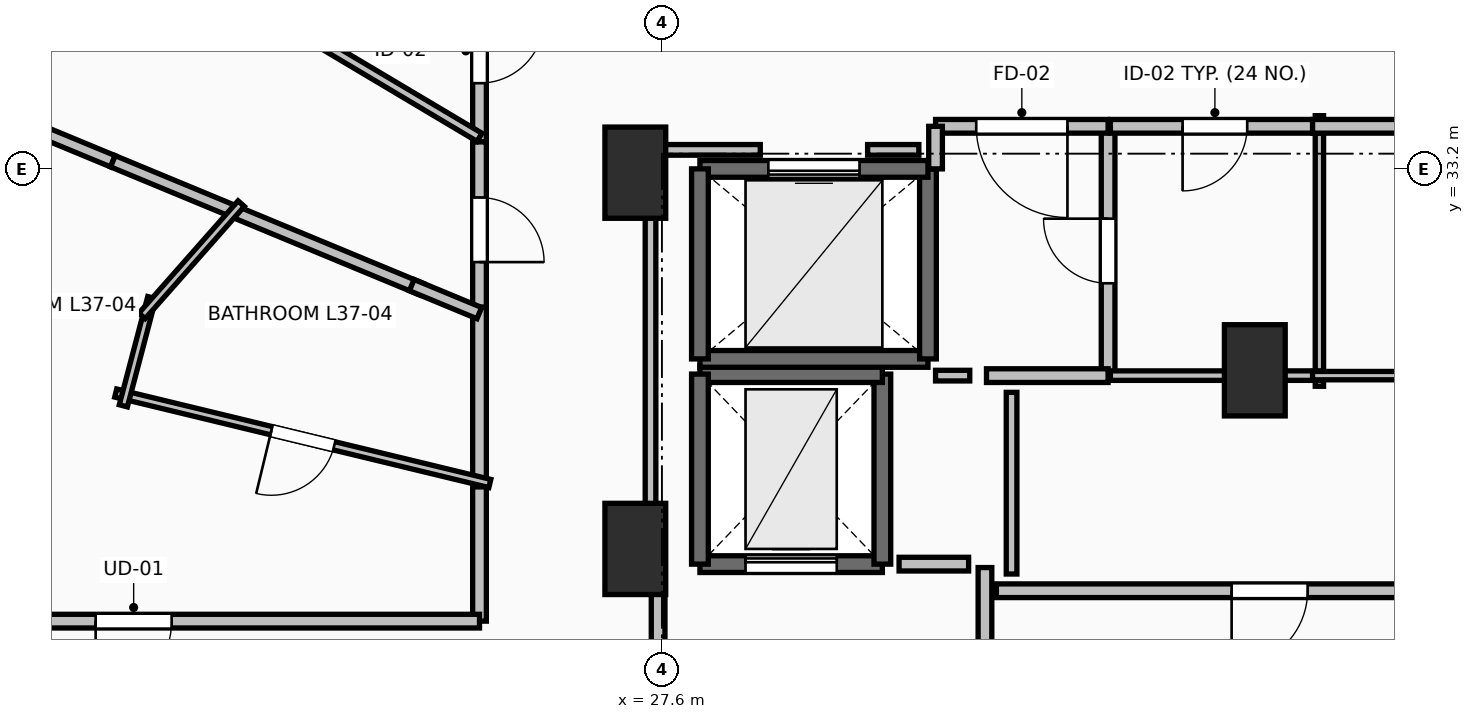
"""IFC4 building model, lengths in metres.
Left out: names, types, materials, properties, quantities, classifications, styles, units other than length and angle.
Written with IfcOpenShell. Run it as: python <this file> out.ifc"""

import sys

from ifc_helpers import new_model, si_unit, direction, frame, frame_2d, origin, origin_2d, place, context, subcontext, project, spatial, rectangle, extrude, element, fill, save


model = new_model("IFC4")
c1 = context("Model", 3, precision=1e-05, world=origin(), true_north=direction((0.0, 1.0)))
c2 = subcontext(c1, "Body", "Model", "MODEL_VIEW")
j1 = project(units=[si_unit("LENGTHUNIT", "METRE"), si_unit("PLANEANGLEUNIT", "RADIAN")], contexts=[c1])
p1 = place(None, origin())
s1 = spatial("IfcSite", under=j1, at=p1, CompositionType="ELEMENT")
p2 = place(p1, origin())
s2 = spatial("IfcBuilding", under=s1, at=p2, CompositionType="ELEMENT")
p3 = place(p2, frame((0.0, 0.0, 139.6)))
s3 = spatial("IfcBuildingStorey", under=s2, at=p3, CompositionType="ELEMENT", Elevation=139.6)
for number, where, z_axis, x_axis in (
    (1, (27.25, 28.2, 0.0), (0.0, 0.0, 1.0), (1.0, 0.0, 0.0)),
    (2, (27.25, 33.15, 0.0), (0.0, 0.0, 1.0), (1.0, 0.0, 0.0)),
    (3, (35.4, 30.55, 0.0), (0.0, 0.0, 1.0), (1.0, 0.0, 0.0)),
):
    element("IfcColumn", number, at=place(p3, frame(where, z_axis=z_axis, x_axis=x_axis)), inside=s3, PredefinedType="PILASTER", context=c2, shape_type="SweptSolid", body=[
        extrude(rectangle(XDim=0.8, YDim=1.2, at=origin_2d()), origin(), (0.0, 0.0, 1.0), 3.5),
    ])
p4 = place(p3, frame((28.1, 28.0, 0.0), z_axis=(0.0, 0.0, 1.0), x_axis=(1.0, 0.0, 0.0)))
e4 = element("IfcWall", 4, at=p4, inside=s3, PredefinedType="SHEAR", context=c2, shape_type="SweptSolid", body=[
    extrude(rectangle(XDim=2.4, YDim=0.22, at=frame_2d((1.2, 0.0))), origin(), (0.0, 0.0, 1.0), 3.24),
])
p5 = place(p4, frame((0.6, 0.0, 0.0)))
e5 = element("IfcOpeningElement", 5, at=p5, cuts=e4, PredefinedType="OPENING", context=c2, shape_type="SweptSolid", body=[
    extrude(rectangle(XDim=1.2, YDim=2.2, at=frame_2d((0.6, 1.1))), frame((0.0, 0.125, 0.0), z_axis=(0.0, -1.0, 0.0), x_axis=(1.0, 0.0, 0.0)), (0.0, 0.0, 1.0), 0.25),
])
p6 = place(p3, frame((30.5, 28.0, 0.0), z_axis=(0.0, 0.0, 1.0), x_axis=(0.0, 1.0, 0.0)))
e6 = element("IfcWall", 6, at=p6, inside=s3, PredefinedType="SHEAR", context=c2, shape_type="SweptSolid", body=[
    extrude(rectangle(XDim=2.5, YDim=0.22, at=frame_2d((1.25, 0.0))), origin(), (0.0, 0.0, 1.0), 3.24),
])
p7 = place(p3, frame((30.5, 30.5, 0.0), z_axis=(0.0, 0.0, 1.0), x_axis=(-1.0, 0.0, 0.0)))
e7 = element("IfcWall", 7, at=p7, inside=s3, PredefinedType="SHEAR", context=c2, shape_type="SweptSolid", body=[
    extrude(rectangle(XDim=2.4, YDim=0.22, at=frame_2d((1.2, 0.0))), origin(), (0.0, 0.0, 1.0), 3.24),
])
p8 = place(p3, frame((28.1, 30.5, 0.0), z_axis=(0.0, 0.0, 1.0), x_axis=(0.0, -1.0, 0.0)))
e8 = element("IfcWall", 8, at=p8, inside=s3, PredefinedType="SHEAR", context=c2, shape_type="SweptSolid", body=[
    extrude(rectangle(XDim=2.5, YDim=0.22, at=frame_2d((1.25, 0.0))), origin(), (0.0, 0.0, 1.0), 3.24),
])
p9 = place(p3, frame((28.1, 30.7, 0.0), z_axis=(0.0, 0.0, 1.0), x_axis=(1.0, 0.0, 0.0)))
e9 = element("IfcWall", 9, at=p9, inside=s3, PredefinedType="SOLIDWALL", context=c2, shape_type="SweptSolid", body=[
    extrude(rectangle(XDim=3.0, YDim=0.22, at=frame_2d((1.5, 0.0))), origin(), (0.0, 0.0, 1.0), 3.24),
])
p10 = place(p3, frame((31.1, 30.7, 0.0), z_axis=(0.0, 0.0, 1.0), x_axis=(0.0, 1.0, 0.0)))
e10 = element("IfcWall", 10, at=p10, inside=s3, PredefinedType="SOLIDWALL", context=c2, shape_type="SweptSolid", body=[
    extrude(rectangle(XDim=2.5, YDim=0.22, at=frame_2d((1.25, 0.0))), origin(), (0.0, 0.0, 1.0), 3.24),
])
p11 = place(p3, frame((31.1, 33.2, 0.0), z_axis=(0.0, 0.0, 1.0), x_axis=(-1.0, 0.0, 0.0)))
e11 = element("IfcWall", 11, at=p11, inside=s3, PredefinedType="SOLIDWALL", context=c2, shape_type="SweptSolid", body=[
    extrude(rectangle(XDim=3.0, YDim=0.22, at=frame_2d((1.5, 0.0))), origin(), (0.0, 0.0, 1.0), 3.24),
])
p12 = place(p11, frame((0.9, 0.0, 0.0)))
e12 = element("IfcOpeningElement", 12, at=p12, cuts=e11, PredefinedType="OPENING", context=c2, shape_type="SweptSolid", body=[
    extrude(rectangle(XDim=1.2, YDim=2.2, at=frame_2d((0.6, 1.1))), frame((0.0, 0.125, 0.0), z_axis=(0.0, -1.0, 0.0), x_axis=(1.0, 0.0, 0.0)), (0.0, 0.0, 1.0), 0.25),
])
p13 = place(p3, frame((28.1, 33.2, 0.0), z_axis=(0.0, 0.0, 1.0), x_axis=(0.0, -1.0, 0.0)))
e13 = element("IfcWall", 13, at=p13, inside=s3, PredefinedType="SOLIDWALL", context=c2, shape_type="SweptSolid", body=[
    extrude(rectangle(XDim=2.5, YDim=0.22, at=frame_2d((1.25, 0.0))), origin(), (0.0, 0.0, 1.0), 3.24),
])
p14 = place(p3, frame((31.85, 24.045, 0.0), z_axis=(0.0, 0.0, 1.0), x_axis=(0.0, 1.0, 0.0)))
e14 = element("IfcWall", 14, at=p14, inside=s3, PredefinedType="PARTITIONING", context=c2, shape_type="SweptSolid", body=[
    extrude(rectangle(XDim=3.91, YDim=0.18, at=frame_2d((1.955, 0.0))), origin(), (0.0, 0.0, 1.0), 3.24),
])
p15 = place(p14, frame((1.355, 0.0, 0.0)))
e15 = element("IfcOpeningElement", 15, at=p15, cuts=e14, PredefinedType="OPENING", context=c2, shape_type="SweptSolid", body=[
    extrude(rectangle(XDim=1.2, YDim=2.15, at=frame_2d((0.6, 1.075))), frame((0.0, 0.105, 0.0), z_axis=(0.0, -1.0, 0.0), x_axis=(1.0, 0.0, 0.0)), (0.0, 0.0, 1.0), 0.21),
])
p16 = place(p3, frame((27.55, 28.0, 0.0), z_axis=(0.0, 0.0, 1.0), x_axis=(0.0, -1.0, 0.0)))
e16 = element("IfcWall", 16, at=p16, inside=s3, PredefinedType="PARTITIONING", context=c2, shape_type="SweptSolid", body=[
    extrude(rectangle(XDim=4.05, YDim=0.18, at=frame_2d((2.025, 0.0))), origin(), (0.0, 0.0, 1.0), 3.24),
])
p17 = place(p16, frame((1.425, 0.0, 0.0)))
e17 = element("IfcOpeningElement", 17, at=p17, cuts=e16, PredefinedType="OPENING", context=c2, shape_type="SweptSolid", body=[
    extrude(rectangle(XDim=1.2, YDim=2.15, at=frame_2d((0.6, 1.075))), frame((0.0, 0.105, 0.0), z_axis=(0.0, -1.0, 0.0), x_axis=(1.0, 0.0, 0.0)), (0.0, 0.0, 1.0), 0.21),
])
p18 = place(p3, frame((33.47, 30.48, 0.0), z_axis=(0.0, 0.0, 1.0), x_axis=(0.0, 1.0, 0.0)))
e18 = element("IfcWall", 18, at=p18, inside=s3, PredefinedType="PARTITIONING", context=c2, shape_type="SweptSolid", body=[
    extrude(rectangle(XDim=3.28, YDim=0.18, at=frame_2d((1.64, 0.0))), origin(), (0.0, 0.0, 1.0), 3.24),
])
p19 = place(p18, frame((1.215, 0.0, 0.0)))
e19 = element("IfcOpeningElement", 19, at=p19, cuts=e18, PredefinedType="OPENING", context=c2, shape_type="SweptSolid", body=[
    extrude(rectangle(XDim=0.85, YDim=2.1, at=frame_2d((0.425, 1.05))), frame((0.0, 0.105, 0.0), z_axis=(0.0, -1.0, 0.0), x_axis=(1.0, 0.0, 0.0)), (0.0, 0.0, 1.0), 0.21),
])
p20 = place(p3, frame((31.87, 30.48, 0.0), z_axis=(0.0, 0.0, 1.0), x_axis=(1.0, 0.0, 0.0)))
e20 = element("IfcWall", 20, at=p20, inside=s3, PredefinedType="PARTITIONING", context=c2, shape_type="SweptSolid", body=[
    extrude(rectangle(XDim=1.6, YDim=0.18, at=frame_2d((0.8, 0.0))), origin(), (0.0, 0.0, 1.0), 3.24),
])
p21 = place(p3, frame((33.47, 33.76, 0.0), z_axis=(0.0, 0.0, 1.0), x_axis=(-1.0, 0.0, 0.0)))
e21 = element("IfcWall", 21, at=p21, inside=s3, PredefinedType="PARTITIONING", context=c2, shape_type="SweptSolid", body=[
    extrude(rectangle(XDim=2.27, YDim=0.18, at=frame_2d((1.135, 0.0))), origin(), (0.0, 0.0, 1.0), 3.24),
])
p22 = place(p21, frame((0.535, 0.0, 0.0)))
e22 = element("IfcOpeningElement", 22, at=p22, cuts=e21, PredefinedType="OPENING", context=c2, shape_type="SweptSolid", body=[
    extrude(rectangle(XDim=1.2, YDim=2.15, at=frame_2d((0.6, 1.075))), frame((0.0, 0.105, 0.0), z_axis=(0.0, -1.0, 0.0), x_axis=(1.0, 0.0, 0.0)), (0.0, 0.0, 1.0), 0.21),
])
p23 = place(p3, frame((31.2, 33.76, 0.0), z_axis=(0.0, 0.0, 1.0), x_axis=(0.0, -1.0, 0.0)))
e23 = element("IfcWall", 23, at=p23, inside=s3, PredefinedType="PARTITIONING", context=c2, shape_type="SweptSolid", body=[
    extrude(rectangle(XDim=0.56, YDim=0.18, at=frame_2d((0.28, 0.0))), origin(), (0.0, 0.0, 1.0), 3.24),
])
p24 = place(p3, frame((39.19, 27.65, 0.0), z_axis=(0.0, 0.0, 1.0), x_axis=(-1.0, 0.0, 0.0)))
e24 = element("IfcWall", 24, at=p24, inside=s3, PredefinedType="PARTITIONING", context=c2, shape_type="SweptSolid", body=[
    extrude(rectangle(XDim=7.19, YDim=0.18, at=frame_2d((3.595, 0.0))), origin(), (0.0, 0.0, 1.0), 3.24),
])
p25 = place(p24, frame((3.095, 0.0, 0.0)))
e25 = element("IfcOpeningElement", 25, at=p25, cuts=e24, PredefinedType="OPENING", context=c2, shape_type="SweptSolid", body=[
    extrude(rectangle(XDim=1.0, YDim=2.15, at=frame_2d((0.5, 1.075))), frame((0.0, 0.105, 0.0), z_axis=(0.0, -1.0, 0.0), x_axis=(1.0, 0.0, 0.0)), (0.0, 0.0, 1.0), 0.21),
])
p26 = place(p3, frame((36.25, 30.34, 0.0), z_axis=(0.0, 0.0, 1.0), x_axis=(0.0, 1.0, 0.0)))
e26 = element("IfcWall", 26, at=p26, inside=s3, PredefinedType="PARTITIONING", context=c2, shape_type="SweptSolid", body=[
    extrude(rectangle(XDim=3.56, YDim=0.11, at=frame_2d((1.78, 0.0))), origin(), (0.0, 0.0, 1.0), 2.432),
])
p27 = place(p3, frame((33.5, 30.48, 0.0), z_axis=(0.0, 0.0, 1.0), x_axis=(1.0, 0.0, 0.0)))
e27 = element("IfcWall", 27, at=p27, inside=s3, PredefinedType="PARTITIONING", context=c2, shape_type="SweptSolid", body=[
    extrude(rectangle(XDim=2.75, YDim=0.125, at=frame_2d((1.375, 0.0))), origin(), (0.0, 0.0, 1.0), 2.432),
])
p28 = place(p3, frame((36.25, 33.76, 0.0), z_axis=(0.0, 0.0, 1.0), x_axis=(-1.0, 0.0, 0.0)))
e28 = element("IfcWall", 28, at=p28, inside=s3, PredefinedType="PARTITIONING", context=c2, shape_type="SweptSolid", body=[
    extrude(rectangle(XDim=2.75, YDim=0.18, at=frame_2d((1.375, 0.0))), origin(), (0.0, 0.0, 1.0), 3.24),
])
p29 = place(p28, frame((0.95, 0.0, 0.0)))
e29 = element("IfcOpeningElement", 29, at=p29, cuts=e28, PredefinedType="OPENING", context=c2, shape_type="SweptSolid", body=[
    extrude(rectangle(XDim=0.85, YDim=2.1, at=frame_2d((0.425, 1.05))), frame((0.0, 0.105, 0.0), z_axis=(0.0, -1.0, 0.0), x_axis=(1.0, 0.0, 0.0)), (0.0, 0.0, 1.0), 0.21),
])
p30 = place(p3, frame((36.16, 30.48, 0.0), z_axis=(0.0, 0.0, 1.0), x_axis=(1.0, 0.0, 0.0)))
e30 = element("IfcWall", 30, at=p30, inside=s3, PredefinedType="PARTITIONING", context=c2, shape_type="SweptSolid", body=[
    extrude(rectangle(XDim=3.16, YDim=0.11, at=frame_2d((1.58, 0.0))), origin(), (0.0, 0.0, 1.0), 2.432),
])
p31 = place(p3, frame((39.79, 33.76, 0.0), z_axis=(0.0, 0.0, 1.0), x_axis=(-1.0, 0.0, 0.0)))
e31 = element("IfcWall", 31, at=p31, inside=s3, PredefinedType="PARTITIONING", context=c2, shape_type="SweptSolid", body=[
    extrude(rectangle(XDim=3.63, YDim=0.18, at=frame_2d((1.815, 0.0))), origin(), (0.0, 0.0, 1.0), 3.24),
])
p32 = place(p31, frame((1.39, 0.0, 0.0)))
e32 = element("IfcOpeningElement", 32, at=p32, cuts=e31, PredefinedType="OPENING", context=c2, shape_type="SweptSolid", body=[
    extrude(rectangle(XDim=0.85, YDim=2.1, at=frame_2d((0.425, 1.05))), frame((0.0, 0.105, 0.0), z_axis=(0.0, -1.0, 0.0), x_axis=(1.0, 0.0, 0.0)), (0.0, 0.0, 1.0), 0.21),
])
p33 = place(p3, frame((25.2, 35.95, 0.0), z_axis=(0.0, 0.0, 1.0), x_axis=(0.0, -1.0, 0.0)))
e33 = element("IfcWall", 33, at=p33, inside=s3, PredefinedType="PARTITIONING", context=c2, shape_type="SweptSolid", body=[
    extrude(rectangle(XDim=2.395, YDim=0.18, at=frame_2d((1.198, 0.0))), origin(), (0.0, 0.0, 1.0), 2.432),
])
p34 = place(p33, frame((0.772, 0.0, 0.0)))
e34 = element("IfcOpeningElement", 34, at=p34, cuts=e33, PredefinedType="OPENING", context=c2, shape_type="SweptSolid", body=[
    extrude(rectangle(XDim=0.85, YDim=2.1, at=frame_2d((0.425, 1.05))), frame((0.0, 0.105, 0.0), z_axis=(0.0, -1.0, 0.0), x_axis=(1.0, 0.0, 0.0)), (0.0, 0.0, 1.0), 0.21),
])
p35 = place(p3, frame((25.2, 33.555, 0.0), z_axis=(0.0, 0.0, 1.0), x_axis=(0.0, -1.0, 0.0)))
e35 = element("IfcWall", 35, at=p35, inside=s3, PredefinedType="PARTITIONING", context=c2, shape_type="SweptSolid", body=[
    extrude(rectangle(XDim=2.313, YDim=0.18, at=frame_2d((1.156, 0.0))), origin(), (0.0, 0.0, 1.0), 3.24),
])
p36 = place(p35, frame((0.731, 0.0, 0.0)))
e36 = element("IfcOpeningElement", 36, at=p36, cuts=e35, PredefinedType="OPENING", context=c2, shape_type="SweptSolid", body=[
    extrude(rectangle(XDim=0.85, YDim=2.1, at=frame_2d((0.425, 1.05))), frame((0.0, 0.105, 0.0), z_axis=(0.0, -1.0, 0.0), x_axis=(1.0, 0.0, 0.0)), (0.0, 0.0, 1.0), 0.21),
])
p37 = place(p3, frame((25.2, 29.156, 0.0), z_axis=(0.0, 0.0, 1.0), x_axis=(0.0, -1.0, 0.0)))
e37 = element("IfcWall", 37, at=p37, inside=s3, PredefinedType="PARTITIONING", context=c2, shape_type="SweptSolid", body=[
    extrude(rectangle(XDim=1.906, YDim=0.18, at=frame_2d((0.953, 0.0))), origin(), (0.0, 0.0, 1.0), 2.432),
])
p38 = place(p3, frame((25.2, 27.25, 0.0), z_axis=(0.0, 0.0, 1.0), x_axis=(-1.0, 0.0, 0.0)))
e38 = element("IfcWall", 38, at=p38, inside=s3, PredefinedType="PARTITIONING", context=c2, shape_type="SweptSolid", body=[
    extrude(rectangle(XDim=9.1, YDim=0.18, at=frame_2d((4.55, 0.0))), origin(), (0.0, 0.0, 1.0), 2.432),
])
p39 = place(p38, frame((4.05, 0.0, 0.0)))
e39 = element("IfcOpeningElement", 39, at=p39, cuts=e38, PredefinedType="OPENING", context=c2, shape_type="SweptSolid", body=[
    extrude(rectangle(XDim=1.0, YDim=2.15, at=frame_2d((0.5, 1.075))), frame((0.0, 0.105, 0.0), z_axis=(0.0, -1.0, 0.0), x_axis=(1.0, 0.0, 0.0)), (0.0, 0.0, 1.0), 0.21),
])
p40 = place(p3, frame((25.2, 31.382, 0.0), z_axis=(0.0, 0.0, 1.0), x_axis=(0.0, -1.0, 0.0)))
e40 = element("IfcWall", 40, at=p40, inside=s3, PredefinedType="PARTITIONING", context=c2, shape_type="SweptSolid", body=[
    extrude(rectangle(XDim=2.366, YDim=0.18, at=frame_2d((1.183, 0.0))), origin(), (0.0, 0.0, 1.0), 2.432),
])
p41 = place(p3, frame((18.603, 37.54, 0.0), z_axis=(0.0, 0.0, 1.0), x_axis=(0.859389720334, -0.511321140365, 0.0)))
e41 = element("IfcWall", 41, at=p41, inside=s3, PredefinedType="PARTITIONING", context=c2, shape_type="SweptSolid", body=[
    extrude(rectangle(XDim=7.676, YDim=0.125, at=frame_2d((3.838, 0.0))), origin(), (0.0, 0.0, 1.0), 2.728),
])
p42 = place(p3, frame((16.355, 34.966, 0.0), z_axis=(0.0, 0.0, 1.0), x_axis=(0.923874659351, -0.382695197002, 0.0)))
e42 = element("IfcWall", 42, at=p42, inside=s3, PredefinedType="PARTITIONING", context=c2, shape_type="SweptSolid", body=[
    extrude(rectangle(XDim=4.353, YDim=0.16, at=frame_2d((2.177, 0.0))), origin(), (0.0, 0.0, 1.0), 2.728),
])
p43 = place(p3, frame((20.377, 33.3, 0.0), z_axis=(0.0, 0.0, 1.0), x_axis=(0.923801529802, -0.382871693306, 0.0)))
e43 = element("IfcWall", 43, at=p43, inside=s3, PredefinedType="PARTITIONING", context=c2, shape_type="SweptSolid", body=[
    extrude(rectangle(XDim=4.396, YDim=0.16, at=frame_2d((2.198, 0.0))), origin(), (0.0, 0.0, 1.0), 2.922),
])
p44 = place(p3, frame((24.309, 31.671, 0.0), z_axis=(0.0, 0.0, 1.0), x_axis=(0.923855963606, -0.38274032778, 0.0)))
e44 = element("IfcWall", 44, at=p44, inside=s3, PredefinedType="PARTITIONING", context=c2, shape_type="SweptSolid", body=[
    extrude(rectangle(XDim=0.962, YDim=0.16, at=frame_2d((0.481, 0.0))), origin(), (0.0, 0.0, 1.0), 2.972),
])
p45 = place(p3, frame((25.336, 29.061, 0.0), z_axis=(0.0, 0.0, 1.0), x_axis=(-0.972001766098, 0.234973544686, 0.0)))
e45 = element("IfcWall", 45, at=p45, inside=s3, PredefinedType="PARTITIONING", context=c2, shape_type="SweptSolid", body=[
    extrude(rectangle(XDim=5.064, YDim=0.11, at=frame_2d((2.532, 0.0))), origin(), (0.0, 0.0, 1.0), 2.432),
])
p46 = place(p45, frame((2.107, 0.0, 0.0)))
e46 = element("IfcOpeningElement", 46, at=p46, cuts=e45, PredefinedType="OPENING", context=c2, shape_type="SweptSolid", body=[
    extrude(rectangle(XDim=0.85, YDim=2.1, at=frame_2d((0.425, 1.05))), frame((0.0, 0.07, 0.0), z_axis=(0.0, -1.0, 0.0), x_axis=(1.0, 0.0, 0.0)), (0.0, 0.0, 1.0), 0.14),
])
p47 = place(p3, frame((20.514, 30.083, 0.0), z_axis=(0.0, 0.0, 1.0), x_axis=(0.254223916145, 0.967145387447, 0.0)))
e47 = element("IfcWall", 47, at=p47, inside=s3, PredefinedType="PARTITIONING", context=c2, shape_type="SweptSolid", body=[
    extrude(rectangle(XDim=1.472, YDim=0.11, at=frame_2d((0.736, 0.0))), origin(), (0.0, 0.0, 1.0), 2.432),
])
p48 = place(p3, frame((20.76, 31.266, 0.0), z_axis=(0.0, 0.0, 1.0), x_axis=(0.662014950831, 0.749490630279, 0.0)))
e48 = element("IfcWall", 48, at=p48, inside=s3, PredefinedType="PARTITIONING", context=c2, shape_type="SweptSolid", body=[
    extrude(rectangle(XDim=1.97, YDim=0.11, at=frame_2d((0.985, 0.0))), origin(), (0.0, 0.0, 1.0), 2.922),
])
p49 = place(p3, frame((31.635, 28.0, 0.0), z_axis=(0.0, 0.0, 1.0), x_axis=(-1.0, 0.0, 0.0)))
e49 = element("IfcWall", 49, at=p49, inside=s3, PredefinedType="PARTITIONING", context=c2, shape_type="SweptSolid", body=[
    extrude(rectangle(XDim=0.915, YDim=0.18, at=frame_2d((0.458, 0.0))), origin(), (0.0, 0.0, 1.0), 3.24),
])
p50 = place(p3, frame((31.2, 30.48, 0.0), z_axis=(0.0, 0.0, 1.0), x_axis=(1.0, 0.0, 0.0)))
e50 = element("IfcWall", 50, at=p50, inside=s3, PredefinedType="PARTITIONING", context=c2, shape_type="SweptSolid", body=[
    extrude(rectangle(XDim=0.45, YDim=0.14, at=frame_2d((0.225, 0.0))), origin(), (0.0, 0.0, 1.0), 3.24),
])
p51 = place(p3, frame((32.2, 30.26, 0.0), z_axis=(0.0, 0.0, 1.0), x_axis=(0.0, -1.0, 0.0)))
e51 = element("IfcWall", 51, at=p51, inside=s3, PredefinedType="PARTITIONING", context=c2, shape_type="SweptSolid", body=[
    extrude(rectangle(XDim=2.39, YDim=0.14, at=frame_2d((1.195, 0.0))), origin(), (0.0, 0.0, 1.0), 3.24),
])
p52 = place(p3, frame((30.98, 33.45, 0.0), z_axis=(0.0, 0.0, 1.0), x_axis=(-1.0, 0.0, 0.0)))
e52 = element("IfcWall", 52, at=p52, inside=s3, PredefinedType="PARTITIONING", context=c2, shape_type="SweptSolid", body=[
    extrude(rectangle(XDim=0.674, YDim=0.14, at=frame_2d((0.337, 0.0))), origin(), (0.0, 0.0, 1.0), 3.24),
])
p53 = place(p3, frame((28.894, 33.45, 0.0), z_axis=(0.0, 0.0, 1.0), x_axis=(-1.0, 0.0, 0.0)))
e53 = element("IfcWall", 53, at=p53, inside=s3, PredefinedType="PARTITIONING", context=c2, shape_type="SweptSolid", body=[
    extrude(rectangle(XDim=1.444, YDim=0.14, at=frame_2d((0.722, 0.0))), origin(), (0.0, 0.0, 1.0), 2.432),
])
p54 = place(p3, frame((27.45, 33.45, 0.0), z_axis=(0.0, 0.0, 1.0), x_axis=(0.0, -1.0, 0.0)))
e54 = element("IfcWall", 54, at=p54, inside=s3, PredefinedType="PARTITIONING", context=c2, shape_type="SweptSolid", body=[
    extrude(rectangle(XDim=5.254, YDim=0.14, at=frame_2d((2.627, 0.0))), origin(), (0.0, 0.0, 1.0), 2.432),
])
p55 = place(p5, origin())
e55 = element("IfcDoor", 55, at=p55, inside=s3, OperationType="SLIDING_TO_LEFT", PredefinedType="DOOR", context=c2, shape_type="SweptSolid", body=[
    extrude(rectangle(XDim=1.2, YDim=2.2, at=frame_2d((0.6, 1.1))), frame((0.0, 0.025, 0.0), z_axis=(0.0, -1.0, 0.0), x_axis=(1.0, 0.0, 0.0)), (0.0, 0.0, 1.0), 0.05),
])
fill(e5, e55)
p56 = place(p12, origin())
e56 = element("IfcDoor", 56, at=p56, inside=s3, OperationType="SLIDING_TO_LEFT", PredefinedType="DOOR", context=c2, shape_type="SweptSolid", body=[
    extrude(rectangle(XDim=1.2, YDim=2.2, at=frame_2d((0.6, 1.1))), frame((0.0, 0.025, 0.0), z_axis=(0.0, -1.0, 0.0), x_axis=(1.0, 0.0, 0.0)), (0.0, 0.0, 1.0), 0.05),
])
fill(e12, e56)
p57 = place(p19, origin())
e57 = element("IfcDoor", 57, at=p57, inside=s3, OperationType="SINGLE_SWING_RIGHT", PredefinedType="DOOR", context=c2, shape_type="SweptSolid", body=[
    extrude(rectangle(XDim=0.85, YDim=2.1, at=frame_2d((0.425, 1.05))), frame((0.0, 0.025, 0.0), z_axis=(0.0, -1.0, 0.0), x_axis=(1.0, 0.0, 0.0)), (0.0, 0.0, 1.0), 0.05),
])
fill(e19, e57)
p58 = place(p22, origin())
e58 = element("IfcDoor", 58, at=p58, inside=s3, OperationType="SINGLE_SWING_LEFT", PredefinedType="DOOR", context=c2, shape_type="SweptSolid", body=[
    extrude(rectangle(XDim=1.2, YDim=2.15, at=frame_2d((0.6, 1.075))), frame((0.0, 0.025, 0.0), z_axis=(0.0, -1.0, 0.0), x_axis=(1.0, 0.0, 0.0)), (0.0, 0.0, 1.0), 0.05),
])
fill(e22, e58)
p59 = place(p25, origin())
e59 = element("IfcDoor", 59, at=p59, inside=s3, OperationType="SINGLE_SWING_RIGHT", PredefinedType="DOOR", context=c2, shape_type="SweptSolid", body=[
    extrude(rectangle(XDim=1.0, YDim=2.15, at=frame_2d((0.5, 1.075))), frame((0.0, 0.025, 0.0), z_axis=(0.0, -1.0, 0.0), x_axis=(1.0, 0.0, 0.0)), (0.0, 0.0, 1.0), 0.05),
])
fill(e25, e59)
p60 = place(p29, origin())
e60 = element("IfcDoor", 60, at=p60, inside=s3, OperationType="SINGLE_SWING_RIGHT", PredefinedType="DOOR", context=c2, shape_type="SweptSolid", body=[
    extrude(rectangle(XDim=0.85, YDim=2.1, at=frame_2d((0.425, 1.05))), frame((0.0, 0.025, 0.0), z_axis=(0.0, -1.0, 0.0), x_axis=(1.0, 0.0, 0.0)), (0.0, 0.0, 1.0), 0.05),
])
fill(e29, e60)
p61 = place(p39, origin())
e61 = element("IfcDoor", 61, at=p61, inside=s3, OperationType="SINGLE_SWING_RIGHT", PredefinedType="DOOR", context=c2, shape_type="SweptSolid", body=[
    extrude(rectangle(XDim=1.0, YDim=2.15, at=frame_2d((0.5, 1.075))), frame((0.0, 0.025, 0.0), z_axis=(0.0, -1.0, 0.0), x_axis=(1.0, 0.0, 0.0)), (0.0, 0.0, 1.0), 0.05),
])
fill(e39, e61)
p62 = place(p46, origin())
e62 = element("IfcDoor", 62, at=p62, inside=s3, OperationType="SINGLE_SWING_RIGHT", PredefinedType="DOOR", context=c2, shape_type="SweptSolid", body=[
    extrude(rectangle(XDim=0.85, YDim=2.1, at=frame_2d((0.425, 1.05))), frame((0.0, 0.025, 0.0), z_axis=(0.0, -1.0, 0.0), x_axis=(1.0, 0.0, 0.0)), (0.0, 0.0, 1.0), 0.05),
])
fill(e46, e62)
p63 = place(p34, origin())
e63 = element("IfcDoor", 63, at=p63, inside=s3, OperationType="SINGLE_SWING_LEFT", PredefinedType="DOOR", context=c2, shape_type="SweptSolid", body=[
    extrude(rectangle(XDim=0.85, YDim=2.1, at=frame_2d((0.425, 1.05))), frame((0.0, 0.025, 0.0), z_axis=(0.0, -1.0, 0.0), x_axis=(1.0, 0.0, 0.0)), (0.0, 0.0, 1.0), 0.05),
])
fill(e34, e63)
p64 = place(p36, origin())
e64 = element("IfcDoor", 64, at=p64, inside=s3, OperationType="SINGLE_SWING_RIGHT", PredefinedType="DOOR", context=c2, shape_type="SweptSolid", body=[
    extrude(rectangle(XDim=0.85, YDim=2.1, at=frame_2d((0.425, 1.05))), frame((0.0, 0.025, 0.0), z_axis=(0.0, -1.0, 0.0), x_axis=(1.0, 0.0, 0.0)), (0.0, 0.0, 1.0), 0.05),
])
fill(e36, e64)
save(model, sys.argv[1])
